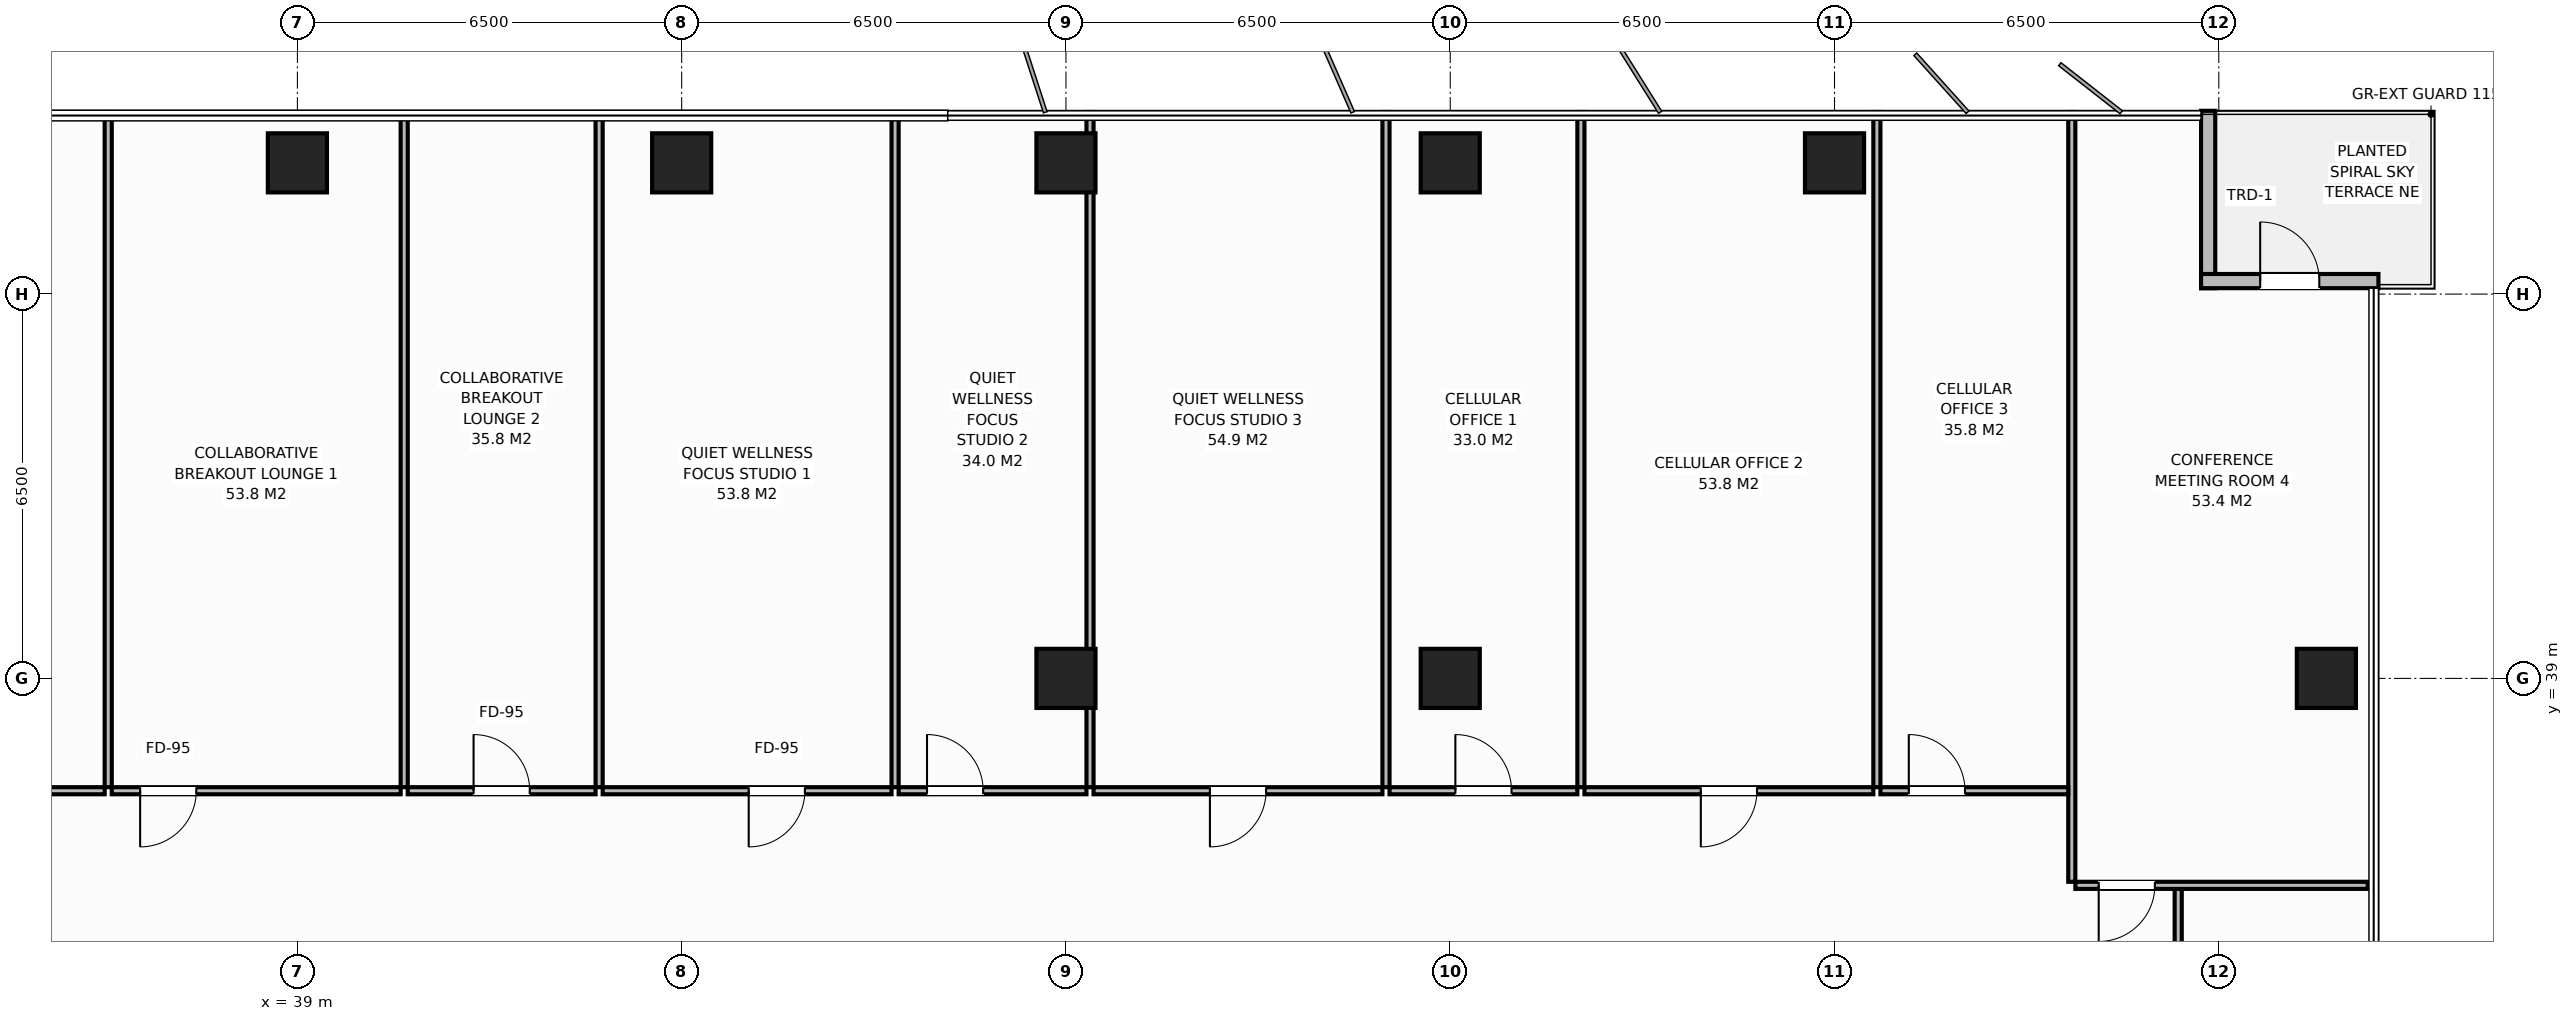
"""IFC4 building model, lengths in metres.
Left out: names, types, materials, properties, quantities, classifications, styles, units other than length and angle.
Written with IfcOpenShell. Run it as: python <this file> out.ifc"""

import sys

from ifc_helpers import new_model, si_unit, direction, frame, frame_2d, origin, origin_2d, place, context, subcontext, project, spatial, rectangle, extrude, element, fill, save


model = new_model("IFC4")
c1 = context("Model", 3, precision=1e-05, world=origin(), true_north=direction((0.0, 1.0)))
c2 = subcontext(c1, "Body", "Model", "MODEL_VIEW")
j1 = project(units=[si_unit("LENGTHUNIT", "METRE"), si_unit("PLANEANGLEUNIT", "RADIAN")], contexts=[c1])
p1 = place(None, origin())
s1 = spatial("IfcSite", under=j1, at=p1, CompositionType="ELEMENT")
p2 = place(p1, origin())
s2 = spatial("IfcBuilding", under=s1, at=p2, CompositionType="ELEMENT")
p3 = place(p2, frame((0.0, 0.0, 189.8)))
s3 = spatial("IfcBuildingStorey", under=s2, at=p3, CompositionType="ELEMENT", Elevation=189.8)
for number, where, z_axis, x_axis in (
    (1, (58.5, 39.0, 0.0), (0.0, 0.0, 1.0), (1.0, 0.0, 0.0)),
    (2, (52.0, 39.0, 0.0), (0.0, 0.0, 1.0), (1.0, 0.0, 0.0)),
    (3, (39.0, 47.72, 0.0), (0.0, 0.0, 1.0), (1.0, 0.0, 0.0)),
    (4, (45.5, 47.72, 0.0), (0.0, 0.0, 1.0), (1.0, 0.0, 0.0)),
    (5, (52.0, 47.72, 0.0), (0.0, 0.0, 1.0), (1.0, 0.0, 0.0)),
    (6, (58.5, 47.72, 0.0), (0.0, 0.0, 1.0), (1.0, 0.0, 0.0)),
    (7, (65.0, 47.72, 0.0), (0.0, 0.0, 1.0), (1.0, 0.0, 0.0)),
    (8, (73.32, 39.0, 0.0), (0.0, 0.0, 1.0), (1.0, 0.0, 0.0)),
):
    element("IfcColumn", number, at=place(p3, frame(where, z_axis=z_axis, x_axis=x_axis)), inside=s3, PredefinedType="COLUMN", context=c2, shape_type="SweptSolid", body=[
        extrude(rectangle(XDim=1.0, YDim=1.0, at=origin_2d()), origin(), (0.0, 0.0, 1.0), 3.8),
    ])
p4 = place(p3, frame((71.32, 48.6, 0.0), z_axis=(0.0, 0.0, 1.0), x_axis=(0.0, -1.0, 0.0)))
e9 = element("IfcWall", 9, at=p4, inside=s3, PredefinedType="STANDARD", context=c2, shape_type="SweptSolid", body=[
    extrude(rectangle(XDim=3.0, YDim=0.24, at=frame_2d((1.5, 0.0))), origin(), (0.0, 0.0, 1.0), 3.572),
])
p5 = place(p3, frame((71.2, 45.72, 0.0), z_axis=(0.0, 0.0, 1.0), x_axis=(1.0, 0.0, 0.0)))
e10 = element("IfcWall", 10, at=p5, inside=s3, PredefinedType="STANDARD", context=c2, shape_type="SweptSolid", body=[
    extrude(rectangle(XDim=3.0, YDim=0.24, at=frame_2d((1.5, 0.0))), origin(), (0.0, 0.0, 1.0), 3.572),
])
p6 = place(p5, frame((1.0, 0.0, 0.0)))
e11 = element("IfcOpeningElement", 11, at=p6, cuts=e10, PredefinedType="OPENING", context=c2, shape_type="SweptSolid", body=[
    extrude(rectangle(XDim=1.0, YDim=2.2, at=frame_2d((0.5, 1.1))), frame((0.0, 0.13, 0.0), z_axis=(0.0, -1.0, 0.0), x_axis=(1.0, 0.0, 0.0)), (0.0, 0.0, 1.0), 0.26),
])
p7 = place(p3, frame((70.813, 33.4, 0.0), z_axis=(0.0, 0.0, 1.0), x_axis=(0.0, 1.0, 0.0)))
e12 = element("IfcWall", 12, at=p7, inside=s3, PredefinedType="PARTITIONING", context=c2, shape_type="SweptSolid", body=[
    extrude(rectangle(XDim=2.1, YDim=0.12, at=frame_2d((1.05, 0.0))), origin(), (0.0, 0.0, 1.0), 3.572),
])
p8 = place(p3, frame((35.8, 37.16, 0.0), z_axis=(0.0, 0.0, 1.0), x_axis=(0.0, 1.0, 0.0)))
e13 = element("IfcWall", 13, at=p8, inside=s3, PredefinedType="PARTITIONING", context=c2, shape_type="SweptSolid", body=[
    extrude(rectangle(XDim=11.42, YDim=0.12, at=frame_2d((5.71, 0.0))), origin(), (0.0, 0.0, 1.0), 3.572),
])
p9 = place(p3, frame((26.42, 37.1, 0.0), z_axis=(0.0, 0.0, 1.0), x_axis=(1.0, 0.0, 0.0)))
e14 = element("IfcWall", 14, at=p9, inside=s3, PredefinedType="PARTITIONING", context=c2, shape_type="SweptSolid", body=[
    extrude(rectangle(XDim=9.32, YDim=0.12, at=frame_2d((4.66, 0.0))), origin(), (0.0, 0.0, 1.0), 3.572),
])
p10 = place(p9, frame((4.185, 0.0, 0.0)))
e15 = element("IfcOpeningElement", 15, at=p10, cuts=e14, PredefinedType="OPENING", context=c2, shape_type="SweptSolid", body=[
    extrude(rectangle(XDim=0.95, YDim=2.15, at=frame_2d((0.475, 1.075))), frame((0.0, 0.07, 0.0), z_axis=(0.0, -1.0, 0.0), x_axis=(1.0, 0.0, 0.0)), (0.0, 0.0, 1.0), 0.14),
])
p11 = place(p3, frame((40.806, 37.16, 0.0), z_axis=(0.0, 0.0, 1.0), x_axis=(0.0, 1.0, 0.0)))
e16 = element("IfcWall", 16, at=p11, inside=s3, PredefinedType="PARTITIONING", context=c2, shape_type="SweptSolid", body=[
    extrude(rectangle(XDim=11.42, YDim=0.12, at=frame_2d((5.71, 0.0))), origin(), (0.0, 0.0, 1.0), 3.572),
])
p12 = place(p3, frame((35.86, 37.1, 0.0), z_axis=(0.0, 0.0, 1.0), x_axis=(1.0, 0.0, 0.0)))
e17 = element("IfcWall", 17, at=p12, inside=s3, PredefinedType="PARTITIONING", context=c2, shape_type="SweptSolid", body=[
    extrude(rectangle(XDim=4.886, YDim=0.12, at=frame_2d((2.443, 0.0))), origin(), (0.0, 0.0, 1.0), 3.572),
])
p13 = place(p12, frame((0.48, 0.0, 0.0)))
e18 = element("IfcOpeningElement", 18, at=p13, cuts=e17, PredefinedType="OPENING", context=c2, shape_type="SweptSolid", body=[
    extrude(rectangle(XDim=0.95, YDim=2.15, at=frame_2d((0.475, 1.075))), frame((0.0, 0.07, 0.0), z_axis=(0.0, -1.0, 0.0), x_axis=(1.0, 0.0, 0.0)), (0.0, 0.0, 1.0), 0.14),
])
p14 = place(p3, frame((44.104, 37.16, 0.0), z_axis=(0.0, 0.0, 1.0), x_axis=(0.0, 1.0, 0.0)))
e19 = element("IfcWall", 19, at=p14, inside=s3, PredefinedType="PARTITIONING", context=c2, shape_type="SweptSolid", body=[
    extrude(rectangle(XDim=11.42, YDim=0.12, at=frame_2d((5.71, 0.0))), origin(), (0.0, 0.0, 1.0), 3.572),
])
p15 = place(p3, frame((40.866, 37.1, 0.0), z_axis=(0.0, 0.0, 1.0), x_axis=(1.0, 0.0, 0.0)))
e20 = element("IfcWall", 20, at=p15, inside=s3, PredefinedType="PARTITIONING", context=c2, shape_type="SweptSolid", body=[
    extrude(rectangle(XDim=3.177, YDim=0.12, at=frame_2d((1.588, 0.0))), origin(), (0.0, 0.0, 1.0), 3.572),
])
p16 = place(p15, frame((1.113, 0.0, 0.0)))
e21 = element("IfcOpeningElement", 21, at=p16, cuts=e20, PredefinedType="OPENING", context=c2, shape_type="SweptSolid", body=[
    extrude(rectangle(XDim=0.95, YDim=2.15, at=frame_2d((0.475, 1.075))), frame((0.0, 0.07, 0.0), z_axis=(0.0, -1.0, 0.0), x_axis=(1.0, 0.0, 0.0)), (0.0, 0.0, 1.0), 0.14),
])
p17 = place(p3, frame((49.11, 37.16, 0.0), z_axis=(0.0, 0.0, 1.0), x_axis=(0.0, 1.0, 0.0)))
e22 = element("IfcWall", 22, at=p17, inside=s3, PredefinedType="PARTITIONING", context=c2, shape_type="SweptSolid", body=[
    extrude(rectangle(XDim=11.42, YDim=0.12, at=frame_2d((5.71, 0.0))), origin(), (0.0, 0.0, 1.0), 3.572),
])
p18 = place(p3, frame((44.163, 37.1, 0.0), z_axis=(0.0, 0.0, 1.0), x_axis=(1.0, 0.0, 0.0)))
e23 = element("IfcWall", 23, at=p18, inside=s3, PredefinedType="PARTITIONING", context=c2, shape_type="SweptSolid", body=[
    extrude(rectangle(XDim=4.886, YDim=0.12, at=frame_2d((2.443, 0.0))), origin(), (0.0, 0.0, 1.0), 3.572),
])
p19 = place(p18, frame((2.47, 0.0, 0.0)))
e24 = element("IfcOpeningElement", 24, at=p19, cuts=e23, PredefinedType="OPENING", context=c2, shape_type="SweptSolid", body=[
    extrude(rectangle(XDim=0.95, YDim=2.15, at=frame_2d((0.475, 1.075))), frame((0.0, 0.07, 0.0), z_axis=(0.0, -1.0, 0.0), x_axis=(1.0, 0.0, 0.0)), (0.0, 0.0, 1.0), 0.14),
])
p20 = place(p3, frame((52.407, 37.16, 0.0), z_axis=(0.0, 0.0, 1.0), x_axis=(0.0, 1.0, 0.0)))
e25 = element("IfcWall", 25, at=p20, inside=s3, PredefinedType="PARTITIONING", context=c2, shape_type="SweptSolid", body=[
    extrude(rectangle(XDim=11.42, YDim=0.12, at=frame_2d((5.71, 0.0))), origin(), (0.0, 0.0, 1.0), 3.572),
])
p21 = place(p3, frame((49.17, 37.1, 0.0), z_axis=(0.0, 0.0, 1.0), x_axis=(1.0, 0.0, 0.0)))
e26 = element("IfcWall", 26, at=p21, inside=s3, PredefinedType="PARTITIONING", context=c2, shape_type="SweptSolid", body=[
    extrude(rectangle(XDim=3.177, YDim=0.12, at=frame_2d((1.588, 0.0))), origin(), (0.0, 0.0, 1.0), 3.572),
])
p22 = place(p21, frame((0.48, 0.0, 0.0)))
e27 = element("IfcOpeningElement", 27, at=p22, cuts=e26, PredefinedType="OPENING", context=c2, shape_type="SweptSolid", body=[
    extrude(rectangle(XDim=0.95, YDim=2.15, at=frame_2d((0.475, 1.075))), frame((0.0, 0.07, 0.0), z_axis=(0.0, -1.0, 0.0), x_axis=(1.0, 0.0, 0.0)), (0.0, 0.0, 1.0), 0.14),
])
p23 = place(p3, frame((57.413, 37.16, 0.0), z_axis=(0.0, 0.0, 1.0), x_axis=(0.0, 1.0, 0.0)))
e28 = element("IfcWall", 28, at=p23, inside=s3, PredefinedType="PARTITIONING", context=c2, shape_type="SweptSolid", body=[
    extrude(rectangle(XDim=11.42, YDim=0.12, at=frame_2d((5.71, 0.0))), origin(), (0.0, 0.0, 1.0), 3.572),
])
p24 = place(p3, frame((52.467, 37.1, 0.0), z_axis=(0.0, 0.0, 1.0), x_axis=(1.0, 0.0, 0.0)))
e29 = element("IfcWall", 29, at=p24, inside=s3, PredefinedType="PARTITIONING", context=c2, shape_type="SweptSolid", body=[
    extrude(rectangle(XDim=4.886, YDim=0.12, at=frame_2d((2.443, 0.0))), origin(), (0.0, 0.0, 1.0), 3.572),
])
p25 = place(p24, frame((1.968, 0.0, 0.0)))
e30 = element("IfcOpeningElement", 30, at=p25, cuts=e29, PredefinedType="OPENING", context=c2, shape_type="SweptSolid", body=[
    extrude(rectangle(XDim=0.95, YDim=2.15, at=frame_2d((0.475, 1.075))), frame((0.0, 0.07, 0.0), z_axis=(0.0, -1.0, 0.0), x_axis=(1.0, 0.0, 0.0)), (0.0, 0.0, 1.0), 0.14),
])
p26 = place(p3, frame((60.71, 37.16, 0.0), z_axis=(0.0, 0.0, 1.0), x_axis=(0.0, 1.0, 0.0)))
e31 = element("IfcWall", 31, at=p26, inside=s3, PredefinedType="PARTITIONING", context=c2, shape_type="SweptSolid", body=[
    extrude(rectangle(XDim=11.42, YDim=0.12, at=frame_2d((5.71, 0.0))), origin(), (0.0, 0.0, 1.0), 3.572),
])
p27 = place(p3, frame((57.473, 37.1, 0.0), z_axis=(0.0, 0.0, 1.0), x_axis=(1.0, 0.0, 0.0)))
e32 = element("IfcWall", 32, at=p27, inside=s3, PredefinedType="PARTITIONING", context=c2, shape_type="SweptSolid", body=[
    extrude(rectangle(XDim=3.177, YDim=0.12, at=frame_2d((1.588, 0.0))), origin(), (0.0, 0.0, 1.0), 3.572),
])
p28 = place(p27, frame((1.114, 0.0, 0.0)))
e33 = element("IfcOpeningElement", 33, at=p28, cuts=e32, PredefinedType="OPENING", context=c2, shape_type="SweptSolid", body=[
    extrude(rectangle(XDim=0.95, YDim=2.15, at=frame_2d((0.475, 1.075))), frame((0.0, 0.07, 0.0), z_axis=(0.0, -1.0, 0.0), x_axis=(1.0, 0.0, 0.0)), (0.0, 0.0, 1.0), 0.14),
])
p29 = place(p3, frame((65.717, 37.16, 0.0), z_axis=(0.0, 0.0, 1.0), x_axis=(0.0, 1.0, 0.0)))
e34 = element("IfcWall", 34, at=p29, inside=s3, PredefinedType="PARTITIONING", context=c2, shape_type="SweptSolid", body=[
    extrude(rectangle(XDim=11.42, YDim=0.12, at=frame_2d((5.71, 0.0))), origin(), (0.0, 0.0, 1.0), 3.572),
])
p30 = place(p3, frame((60.77, 37.1, 0.0), z_axis=(0.0, 0.0, 1.0), x_axis=(1.0, 0.0, 0.0)))
e35 = element("IfcWall", 35, at=p30, inside=s3, PredefinedType="PARTITIONING", context=c2, shape_type="SweptSolid", body=[
    extrude(rectangle(XDim=4.886, YDim=0.12, at=frame_2d((2.443, 0.0))), origin(), (0.0, 0.0, 1.0), 3.572),
])
p31 = place(p30, frame((1.968, 0.0, 0.0)))
e36 = element("IfcOpeningElement", 36, at=p31, cuts=e35, PredefinedType="OPENING", context=c2, shape_type="SweptSolid", body=[
    extrude(rectangle(XDim=0.95, YDim=2.15, at=frame_2d((0.475, 1.075))), frame((0.0, 0.07, 0.0), z_axis=(0.0, -1.0, 0.0), x_axis=(1.0, 0.0, 0.0)), (0.0, 0.0, 1.0), 0.14),
])
p32 = place(p3, frame((69.013, 35.56, 0.0), z_axis=(0.0, 0.0, 1.0), x_axis=(0.0, 1.0, 0.0)))
e37 = element("IfcWall", 37, at=p32, inside=s3, PredefinedType="PARTITIONING", context=c2, shape_type="SweptSolid", body=[
    extrude(rectangle(XDim=13.02, YDim=0.12, at=frame_2d((6.51, 0.0))), origin(), (0.0, 0.0, 1.0), 3.572),
])
p33 = place(p3, frame((65.777, 37.1, 0.0), z_axis=(0.0, 0.0, 1.0), x_axis=(1.0, 0.0, 0.0)))
e38 = element("IfcWall", 38, at=p33, inside=s3, PredefinedType="PARTITIONING", context=c2, shape_type="SweptSolid", body=[
    extrude(rectangle(XDim=3.177, YDim=0.12, at=frame_2d((1.588, 0.0))), origin(), (0.0, 0.0, 1.0), 3.572),
])
p34 = place(p33, frame((0.48, 0.0, 0.0)))
e39 = element("IfcOpeningElement", 39, at=p34, cuts=e38, PredefinedType="OPENING", context=c2, shape_type="SweptSolid", body=[
    extrude(rectangle(XDim=0.95, YDim=2.15, at=frame_2d((0.475, 1.075))), frame((0.0, 0.07, 0.0), z_axis=(0.0, -1.0, 0.0), x_axis=(1.0, 0.0, 0.0)), (0.0, 0.0, 1.0), 0.14),
])
p35 = place(p3, frame((69.073, 35.5, 0.0), z_axis=(0.0, 0.0, 1.0), x_axis=(1.0, 0.0, 0.0)))
e40 = element("IfcWall", 40, at=p35, inside=s3, PredefinedType="PARTITIONING", context=c2, shape_type="SweptSolid", body=[
    extrude(rectangle(XDim=4.947, YDim=0.12, at=frame_2d((2.473, 0.0))), origin(), (0.0, 0.0, 1.0), 3.572),
])
p36 = place(p35, frame((0.395, 0.0, 0.0)))
e41 = element("IfcOpeningElement", 41, at=p36, cuts=e40, PredefinedType="OPENING", context=c2, shape_type="SweptSolid", body=[
    extrude(rectangle(XDim=0.95, YDim=2.15, at=frame_2d((0.475, 1.075))), frame((0.0, 0.07, 0.0), z_axis=(0.0, -1.0, 0.0), x_axis=(1.0, 0.0, 0.0)), (0.0, 0.0, 1.0), 0.14),
])
p37 = place(p6, origin())
e42 = element("IfcDoor", 42, at=p37, inside=s3, OperationType="SINGLE_SWING_LEFT", PredefinedType="DOOR", context=c2, shape_type="SweptSolid", body=[
    extrude(rectangle(XDim=1.0, YDim=2.2, at=frame_2d((0.5, 1.1))), frame((0.0, 0.025, 0.0), z_axis=(0.0, -1.0, 0.0), x_axis=(1.0, 0.0, 0.0)), (0.0, 0.0, 1.0), 0.05),
])
fill(e11, e42)
p38 = place(p13, origin())
e43 = element("IfcDoor", 43, at=p38, inside=s3, OperationType="SINGLE_SWING_RIGHT", PredefinedType="DOOR", context=c2, shape_type="SweptSolid", body=[
    extrude(rectangle(XDim=0.95, YDim=2.15, at=frame_2d((0.475, 1.075))), frame((0.0, 0.025, 0.0), z_axis=(0.0, -1.0, 0.0), x_axis=(1.0, 0.0, 0.0)), (0.0, 0.0, 1.0), 0.05),
])
fill(e18, e43)
p39 = place(p16, origin())
e44 = element("IfcDoor", 44, at=p39, inside=s3, OperationType="SINGLE_SWING_LEFT", PredefinedType="DOOR", context=c2, shape_type="SweptSolid", body=[
    extrude(rectangle(XDim=0.95, YDim=2.15, at=frame_2d((0.475, 1.075))), frame((0.0, 0.025, 0.0), z_axis=(0.0, -1.0, 0.0), x_axis=(1.0, 0.0, 0.0)), (0.0, 0.0, 1.0), 0.05),
])
fill(e21, e44)
p40 = place(p19, origin())
e45 = element("IfcDoor", 45, at=p40, inside=s3, OperationType="SINGLE_SWING_RIGHT", PredefinedType="DOOR", context=c2, shape_type="SweptSolid", body=[
    extrude(rectangle(XDim=0.95, YDim=2.15, at=frame_2d((0.475, 1.075))), frame((0.0, 0.025, 0.0), z_axis=(0.0, -1.0, 0.0), x_axis=(1.0, 0.0, 0.0)), (0.0, 0.0, 1.0), 0.05),
])
fill(e24, e45)
p41 = place(p22, origin())
e46 = element("IfcDoor", 46, at=p41, inside=s3, OperationType="SINGLE_SWING_LEFT", PredefinedType="DOOR", context=c2, shape_type="SweptSolid", body=[
    extrude(rectangle(XDim=0.95, YDim=2.15, at=frame_2d((0.475, 1.075))), frame((0.0, 0.025, 0.0), z_axis=(0.0, -1.0, 0.0), x_axis=(1.0, 0.0, 0.0)), (0.0, 0.0, 1.0), 0.05),
])
fill(e27, e46)
p42 = place(p25, origin())
e47 = element("IfcDoor", 47, at=p42, inside=s3, OperationType="SINGLE_SWING_RIGHT", PredefinedType="DOOR", context=c2, shape_type="SweptSolid", body=[
    extrude(rectangle(XDim=0.95, YDim=2.15, at=frame_2d((0.475, 1.075))), frame((0.0, 0.025, 0.0), z_axis=(0.0, -1.0, 0.0), x_axis=(1.0, 0.0, 0.0)), (0.0, 0.0, 1.0), 0.05),
])
fill(e30, e47)
p43 = place(p28, origin())
e48 = element("IfcDoor", 48, at=p43, inside=s3, OperationType="SINGLE_SWING_LEFT", PredefinedType="DOOR", context=c2, shape_type="SweptSolid", body=[
    extrude(rectangle(XDim=0.95, YDim=2.15, at=frame_2d((0.475, 1.075))), frame((0.0, 0.025, 0.0), z_axis=(0.0, -1.0, 0.0), x_axis=(1.0, 0.0, 0.0)), (0.0, 0.0, 1.0), 0.05),
])
fill(e33, e48)
p44 = place(p31, origin())
e49 = element("IfcDoor", 49, at=p44, inside=s3, OperationType="SINGLE_SWING_RIGHT", PredefinedType="DOOR", context=c2, shape_type="SweptSolid", body=[
    extrude(rectangle(XDim=0.95, YDim=2.15, at=frame_2d((0.475, 1.075))), frame((0.0, 0.025, 0.0), z_axis=(0.0, -1.0, 0.0), x_axis=(1.0, 0.0, 0.0)), (0.0, 0.0, 1.0), 0.05),
])
fill(e36, e49)
p45 = place(p34, origin())
e50 = element("IfcDoor", 50, at=p45, inside=s3, OperationType="SINGLE_SWING_LEFT", PredefinedType="DOOR", context=c2, shape_type="SweptSolid", body=[
    extrude(rectangle(XDim=0.95, YDim=2.15, at=frame_2d((0.475, 1.075))), frame((0.0, 0.025, 0.0), z_axis=(0.0, -1.0, 0.0), x_axis=(1.0, 0.0, 0.0)), (0.0, 0.0, 1.0), 0.05),
])
fill(e39, e50)
p46 = place(p36, origin())
e51 = element("IfcDoor", 51, at=p46, inside=s3, OperationType="SINGLE_SWING_RIGHT", PredefinedType="DOOR", context=c2, shape_type="SweptSolid", body=[
    extrude(rectangle(XDim=0.95, YDim=2.15, at=frame_2d((0.475, 1.075))), frame((0.0, 0.025, 0.0), z_axis=(0.0, -1.0, 0.0), x_axis=(1.0, 0.0, 0.0)), (0.0, 0.0, 1.0), 0.05),
])
fill(e41, e51)
save(model, sys.argv[1])
